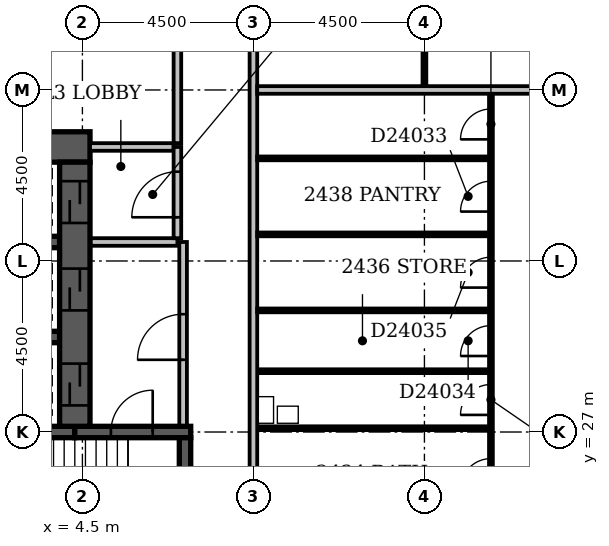
"""IFC4 building model, lengths in metres.
Left out: names, types, materials, properties, quantities, classifications, styles, units other than length and angle.
Written with IfcOpenShell. Run it as: python <this file> out.ifc"""

import sys

from ifc_helpers import new_model, si_unit, direction, frame, frame_2d, origin, place, context, subcontext, project, spatial, rectangle, extrude, element, fill, save


model = new_model("IFC4")
c1 = context("Model", 3, precision=1e-05, world=origin(), true_north=direction((0.0, 1.0)))
c2 = subcontext(c1, "Body", "Model", "MODEL_VIEW")
j1 = project(units=[si_unit("LENGTHUNIT", "METRE"), si_unit("PLANEANGLEUNIT", "RADIAN")], contexts=[c1])
p1 = place(None, origin())
s1 = spatial("IfcSite", under=j1, at=p1, CompositionType="ELEMENT")
p2 = place(p1, origin())
s2 = spatial("IfcBuilding", under=s1, at=p2, CompositionType="ELEMENT")
p3 = place(p2, frame((0.0, 0.0, 97.4)))
s3 = spatial("IfcBuildingStorey", under=s2, at=p3, CompositionType="ELEMENT", Elevation=97.4)
p4 = place(p3, frame((0.1, 34.5, -0.3), z_axis=(0.0, 0.0, 1.0), x_axis=(1.0, 0.0, 0.0)))
e1 = element("IfcWall", 1, at=p4, inside=s3, PredefinedType="SHEAR", context=c2, shape_type="SweptSolid", body=[
    extrude(rectangle(XDim=4.6, YDim=0.8, at=frame_2d((2.3, 0.0))), origin(), (0.0, 0.0, 1.0), 3.6),
])
p5 = place(p3, frame((0.35, 27.0, -0.3), z_axis=(0.0, 0.0, 1.0), x_axis=(1.0, 0.0, 0.0)))
e2 = element("IfcWall", 2, at=p5, inside=s3, PredefinedType="SHEAR", context=c2, shape_type="SweptSolid", body=[
    extrude(rectangle(XDim=3.95, YDim=0.3, at=frame_2d((1.975, 0.0))), origin(), (0.0, 0.0, 1.0), 3.6),
])
for number, where, z_axis, x_axis in (
    (3, (0.9, 29.5, -0.3), (0.0, 0.0, 1.0), (1.0, 0.0, 0.0)),
    (4, (0.9, 32.0, -0.3), (0.0, 0.0, 1.0), (1.0, 0.0, 0.0)),
):
    element("IfcWall", number, at=place(p3, frame(where, z_axis=z_axis, x_axis=x_axis)), inside=s3, PredefinedType="SHEAR", context=c2, shape_type="SweptSolid", body=[
        extrude(rectangle(XDim=3.0, YDim=0.3, at=frame_2d((1.5, 0.0))), origin(), (0.0, 0.0, 1.0), 3.6),
    ])
p6 = place(p3, frame((4.3, 27.0, -0.3), z_axis=(0.0, 0.0, 1.0), x_axis=(1.0, 0.0, 0.0)))
e5 = element("IfcWall", 5, at=p6, inside=s3, PredefinedType="SHEAR", context=c2, shape_type="SweptSolid", body=[
    extrude(rectangle(XDim=3.05, YDim=0.3, at=frame_2d((1.525, 0.0))), origin(), (0.0, 0.0, 1.0), 3.6),
])
p7 = place(p6, frame((0.95, 0.0, 0.3)))
e6 = element("IfcOpeningElement", 6, at=p7, cuts=e5, PredefinedType="OPENING", context=c2, shape_type="SweptSolid", body=[
    extrude(rectangle(XDim=1.1, YDim=2.1, at=frame_2d((0.55, 1.05))), frame((0.0, 0.162, 0.0), z_axis=(0.0, -1.0, 0.0), x_axis=(1.0, 0.0, 0.0)), (0.0, 0.0, 1.0), 0.324),
])
p8 = place(p3, frame((4.3, 27.15, -0.3), z_axis=(0.0, 0.0, 1.0), x_axis=(0.0, 1.0, 0.0)))
e7 = element("IfcWall", 7, at=p8, inside=s3, PredefinedType="SHEAR", context=c2, shape_type="SweptSolid", body=[
    extrude(rectangle(XDim=6.95, YDim=0.8, at=frame_2d((3.475, 0.0))), origin(), (0.0, 0.0, 1.0), 3.6),
])
p9 = place(p8, frame((3.05, 0.0, 0.3)))
e8 = element("IfcOpeningElement", 8, at=p9, cuts=e7, PredefinedType="OPENING", context=c2, shape_type="SweptSolid", body=[
    extrude(rectangle(XDim=1.1, YDim=2.1, at=frame_2d((0.55, 1.05))), frame((0.0, 0.412, 0.0), z_axis=(0.0, -1.0, 0.0), x_axis=(1.0, 0.0, 0.0)), (0.0, 0.0, 1.0), 0.824),
])
p10 = place(p8, frame((0.55, 0.0, 0.3)))
e9 = element("IfcOpeningElement", 9, at=p10, cuts=e7, PredefinedType="OPENING", context=c2, shape_type="SweptSolid", body=[
    extrude(rectangle(XDim=1.1, YDim=2.1, at=frame_2d((0.55, 1.05))), frame((0.0, 0.412, 0.0), z_axis=(0.0, -1.0, 0.0), x_axis=(1.0, 0.0, 0.0)), (0.0, 0.0, 1.0), 0.824),
])
p11 = place(p8, frame((5.35, 0.0, 0.3)))
e10 = element("IfcOpeningElement", 10, at=p11, cuts=e7, PredefinedType="OPENING", context=c2, shape_type="SweptSolid", body=[
    extrude(rectangle(XDim=1.1, YDim=2.1, at=frame_2d((0.55, 1.05))), frame((0.0, 0.412, 0.0), z_axis=(0.0, -1.0, 0.0), x_axis=(1.0, 0.0, 0.0)), (0.0, 0.0, 1.0), 0.824),
])
p12 = place(p3, frame((7.2, 22.65, -0.3), z_axis=(0.0, 0.0, 1.0), x_axis=(0.0, 1.0, 0.0)))
e11 = element("IfcWall", 11, at=p12, inside=s3, PredefinedType="SHEAR", context=c2, shape_type="SweptSolid", body=[
    extrude(rectangle(XDim=4.2, YDim=0.3, at=frame_2d((2.1, 0.0))), origin(), (0.0, 0.0, 1.0), 3.6),
])
p13 = place(p12, frame((0.8, 0.0, 0.3)))
e12 = element("IfcOpeningElement", 12, at=p13, cuts=e11, PredefinedType="OPENING", context=c2, shape_type="SweptSolid", body=[
    extrude(rectangle(XDim=1.1, YDim=2.1, at=frame_2d((0.55, 1.05))), frame((0.0, 0.162, 0.0), z_axis=(0.0, -1.0, 0.0), x_axis=(1.0, 0.0, 0.0)), (0.0, 0.0, 1.0), 0.324),
])
p14 = place(p3, frame((4.72, 32.0, 0.0), z_axis=(0.0, 0.0, 1.0), x_axis=(1.0, 0.0, 0.0)))
e13 = element("IfcWall", 13, at=p14, inside=s3, PredefinedType="PARTITIONING", context=c2, shape_type="SweptSolid", body=[
    extrude(rectangle(XDim=2.28, YDim=0.2, at=frame_2d((1.14, 0.0))), origin(), (0.0, 0.0, 1.0), 3.3),
])
p15 = place(p3, frame((7.0, 32.1, 0.0), z_axis=(0.0, 0.0, 1.0), x_axis=(0.0, 1.0, 0.0)))
e14 = element("IfcWall", 14, at=p15, inside=s3, PredefinedType="PARTITIONING", context=c2, shape_type="SweptSolid", body=[
    extrude(rectangle(XDim=2.4, YDim=0.2, at=frame_2d((1.2, 0.0))), origin(), (0.0, 0.0, 1.0), 3.3),
])
p16 = place(p15, frame((0.55, 0.0, 0.0)))
e15 = element("IfcOpeningElement", 15, at=p16, cuts=e14, PredefinedType="OPENING", context=c2, shape_type="SweptSolid", body=[
    extrude(rectangle(XDim=1.2, YDim=2.1, at=frame_2d((0.6, 1.05))), frame((0.0, 0.112, 0.0), z_axis=(0.0, -1.0, 0.0), x_axis=(1.0, 0.0, 0.0)), (0.0, 0.0, 1.0), 0.224),
])
p17 = place(p3, frame((4.7, 34.5, 0.0), z_axis=(0.0, 0.0, 1.0), x_axis=(1.0, 0.0, 0.0)))
e16 = element("IfcWall", 16, at=p17, inside=s3, PredefinedType="PARTITIONING", context=c2, shape_type="SweptSolid", body=[
    extrude(rectangle(XDim=2.2, YDim=0.2, at=frame_2d((1.1, 0.0))), origin(), (0.0, 0.0, 1.0), 3.3),
])
p18 = place(p3, frame((7.15, 27.17, 0.0), z_axis=(0.0, 0.0, 1.0), x_axis=(0.0, 1.0, 0.0)))
e17 = element("IfcWall", 17, at=p18, inside=s3, PredefinedType="PARTITIONING", context=c2, shape_type="SweptSolid", body=[
    extrude(rectangle(XDim=4.83, YDim=0.2, at=frame_2d((2.415, 0.0))), origin(), (0.0, 0.0, 1.0), 3.3),
])
p19 = place(p18, frame((1.73, 0.0, 0.0)))
e18 = element("IfcOpeningElement", 18, at=p19, cuts=e17, PredefinedType="OPENING", context=c2, shape_type="SweptSolid", body=[
    extrude(rectangle(XDim=1.2, YDim=2.1, at=frame_2d((0.6, 1.05))), frame((0.0, 0.112, 0.0), z_axis=(0.0, -1.0, 0.0), x_axis=(1.0, 0.0, 0.0)), (0.0, 0.0, 1.0), 0.224),
])
p20 = place(p3, frame((9.0, 5.0, 0.0), z_axis=(0.0, 0.0, 1.0), x_axis=(0.0, 1.0, 0.0)))
e19 = element("IfcWall", 19, at=p20, inside=s3, PredefinedType="PARTITIONING", context=c2, shape_type="SweptSolid", body=[
    extrude(rectangle(XDim=44.5, YDim=0.2, at=frame_2d((22.25, 0.0))), origin(), (0.0, 0.0, 1.0), 3.3),
])
p21 = place(p20, frame((18.4, 0.0, 0.0)))
e20 = element("IfcOpeningElement", 20, at=p21, cuts=e19, PredefinedType="OPENING", context=c2, shape_type="SweptSolid", body=[
    extrude(rectangle(XDim=1.0, YDim=2.1, at=frame_2d((0.5, 1.05))), frame((0.0, 0.112, 0.0), z_axis=(0.0, -1.0, 0.0), x_axis=(1.0, 0.0, 0.0)), (0.0, 0.0, 1.0), 0.224),
])
p22 = place(p20, frame((11.7, 0.0, 0.0)))
e21 = element("IfcOpeningElement", 21, at=p22, cuts=e19, PredefinedType="OPENING", context=c2, shape_type="SweptSolid", body=[
    extrude(rectangle(XDim=1.0, YDim=2.1, at=frame_2d((0.5, 1.05))), frame((0.0, 0.112, 0.0), z_axis=(0.0, -1.0, 0.0), x_axis=(1.0, 0.0, 0.0)), (0.0, 0.0, 1.0), 0.224),
])
p23 = place(p20, frame((37.25, 0.0, 0.0)))
e22 = element("IfcOpeningElement", 22, at=p23, cuts=e19, PredefinedType="OPENING", context=c2, shape_type="SweptSolid", body=[
    extrude(rectangle(XDim=0.9, YDim=2.1, at=frame_2d((0.45, 1.05))), frame((0.0, 0.112, 0.0), z_axis=(0.0, -1.0, 0.0), x_axis=(1.0, 0.0, 0.0)), (0.0, 0.0, 1.0), 0.224),
])
p24 = place(p20, frame((1.5, 0.0, 0.0)))
e23 = element("IfcOpeningElement", 23, at=p24, cuts=e19, PredefinedType="OPENING", context=c2, shape_type="SweptSolid", body=[
    extrude(rectangle(XDim=0.9, YDim=2.1, at=frame_2d((0.45, 1.05))), frame((0.0, 0.112, 0.0), z_axis=(0.0, -1.0, 0.0), x_axis=(1.0, 0.0, 0.0)), (0.0, 0.0, 1.0), 0.224),
])
p25 = place(p3, frame((15.25, 24.7, 0.0), z_axis=(0.0, 0.0, 1.0), x_axis=(0.0, 1.0, 0.0)))
e24 = element("IfcWall", 24, at=p25, inside=s3, PredefinedType="PARTITIONING", context=c2, shape_type="SweptSolid", body=[
    extrude(rectangle(XDim=11.2, YDim=0.1, at=frame_2d((5.6, 0.0))), origin(), (0.0, 0.0, 1.0), 3.3),
])
p26 = place(p25, frame((0.8, 0.0, 0.0)))
e25 = element("IfcOpeningElement", 25, at=p26, cuts=e24, PredefinedType="OPENING", context=c2, shape_type="SweptSolid", body=[
    extrude(rectangle(XDim=0.8, YDim=2.1, at=frame_2d((0.4, 1.05))), frame((0.0, 0.062, 0.0), z_axis=(0.0, -1.0, 0.0), x_axis=(1.0, 0.0, 0.0)), (0.0, 0.0, 1.0), 0.124),
])
p27 = place(p25, frame((8.1, 0.0, 0.0)))
e26 = element("IfcOpeningElement", 26, at=p27, cuts=e24, PredefinedType="OPENING", context=c2, shape_type="SweptSolid", body=[
    extrude(rectangle(XDim=0.8, YDim=2.1, at=frame_2d((0.4, 1.05))), frame((0.0, 0.062, 0.0), z_axis=(0.0, -1.0, 0.0), x_axis=(1.0, 0.0, 0.0)), (0.0, 0.0, 1.0), 0.124),
])
p28 = place(p25, frame((4.3, 0.0, 0.0)))
e27 = element("IfcOpeningElement", 27, at=p28, cuts=e24, PredefinedType="OPENING", context=c2, shape_type="SweptSolid", body=[
    extrude(rectangle(XDim=0.8, YDim=2.1, at=frame_2d((0.4, 1.05))), frame((0.0, 0.062, 0.0), z_axis=(0.0, -1.0, 0.0), x_axis=(1.0, 0.0, 0.0)), (0.0, 0.0, 1.0), 0.124),
])
p29 = place(p25, frame((6.1, 0.0, 0.0)))
e28 = element("IfcOpeningElement", 28, at=p29, cuts=e24, PredefinedType="OPENING", context=c2, shape_type="SweptSolid", body=[
    extrude(rectangle(XDim=0.8, YDim=2.1, at=frame_2d((0.4, 1.05))), frame((0.0, 0.062, 0.0), z_axis=(0.0, -1.0, 0.0), x_axis=(1.0, 0.0, 0.0)), (0.0, 0.0, 1.0), 0.124),
])
p30 = place(p25, frame((10.0, 0.0, 0.0)))
e29 = element("IfcOpeningElement", 29, at=p30, cuts=e24, PredefinedType="OPENING", context=c2, shape_type="SweptSolid", body=[
    extrude(rectangle(XDim=0.8, YDim=2.1, at=frame_2d((0.4, 1.05))), frame((0.0, 0.062, 0.0), z_axis=(0.0, -1.0, 0.0), x_axis=(1.0, 0.0, 0.0)), (0.0, 0.0, 1.0), 0.124),
])
p31 = place(p25, frame((2.75, 0.0, 0.0)))
e30 = element("IfcOpeningElement", 30, at=p31, cuts=e24, PredefinedType="OPENING", context=c2, shape_type="SweptSolid", body=[
    extrude(rectangle(XDim=0.8, YDim=2.1, at=frame_2d((0.4, 1.05))), frame((0.0, 0.062, 0.0), z_axis=(0.0, -1.0, 0.0), x_axis=(1.0, 0.0, 0.0)), (0.0, 0.0, 1.0), 0.124),
])
p32 = place(p3, frame((9.1, 27.1, 0.0), z_axis=(0.0, 0.0, 1.0), x_axis=(1.0, 0.0, 0.0)))
e31 = element("IfcWall", 31, at=p32, inside=s3, PredefinedType="PLUMBINGWALL", context=c2, shape_type="SweptSolid", body=[
    extrude(rectangle(XDim=6.1, YDim=0.1, at=frame_2d((3.05, 0.0))), origin(), (0.0, 0.0, 1.0), 2.7),
])
p33 = place(p3, frame((9.1, 28.6, 0.0), z_axis=(0.0, 0.0, 1.0), x_axis=(1.0, 0.0, 0.0)))
e32 = element("IfcWall", 32, at=p33, inside=s3, PredefinedType="PLUMBINGWALL", context=c2, shape_type="SweptSolid", body=[
    extrude(rectangle(XDim=6.1, YDim=0.1, at=frame_2d((3.05, 0.0))), origin(), (0.0, 0.0, 1.0), 3.3),
])
for number, where, z_axis, x_axis in (
    (33, (9.1, 30.2, 0.0), (0.0, 0.0, 1.0), (1.0, 0.0, 0.0)),
    (34, (9.1, 32.2, 0.0), (0.0, 0.0, 1.0), (1.0, 0.0, 0.0)),
    (35, (9.1, 34.2, 0.0), (0.0, 0.0, 1.0), (1.0, 0.0, 0.0)),
):
    element("IfcWall", number, at=place(p3, frame(where, z_axis=z_axis, x_axis=x_axis)), inside=s3, PredefinedType="PARTITIONING", context=c2, shape_type="SweptSolid", body=[
        extrude(rectangle(XDim=6.1, YDim=0.1, at=frame_2d((3.05, 0.0))), origin(), (0.0, 0.0, 1.0), 3.3),
    ])
p34 = place(p3, frame((7.0, 34.6, 0.0), z_axis=(0.0, 0.0, 1.0), x_axis=(0.0, 1.0, 0.0)))
e36 = element("IfcWall", 36, at=p34, inside=s3, PredefinedType="PARTITIONING", context=c2, shape_type="SweptSolid", body=[
    extrude(rectangle(XDim=14.8, YDim=0.2, at=frame_2d((7.4, 0.0))), origin(), (0.0, 0.0, 1.0), 3.3),
])
p35 = place(p34, frame((4.45, 0.0, 0.0)))
e37 = element("IfcOpeningElement", 37, at=p35, cuts=e36, PredefinedType="OPENING", context=c2, shape_type="SweptSolid", body=[
    extrude(rectangle(XDim=0.9, YDim=2.1, at=frame_2d((0.45, 1.05))), frame((0.0, 0.112, 0.0), z_axis=(0.0, -1.0, 0.0), x_axis=(1.0, 0.0, 0.0)), (0.0, 0.0, 1.0), 0.224),
])
p36 = place(p34, frame((11.95, 0.0, 0.0)))
e38 = element("IfcOpeningElement", 38, at=p36, cuts=e36, PredefinedType="OPENING", context=c2, shape_type="SweptSolid", body=[
    extrude(rectangle(XDim=0.9, YDim=2.1, at=frame_2d((0.45, 1.05))), frame((0.0, 0.112, 0.0), z_axis=(0.0, -1.0, 0.0), x_axis=(1.0, 0.0, 0.0)), (0.0, 0.0, 1.0), 0.224),
])
p37 = place(p3, frame((9.1, 36.0, 0.0), z_axis=(0.0, 0.0, 1.0), x_axis=(1.0, 0.0, 0.0)))
e39 = element("IfcWall", 39, at=p37, inside=s3, PredefinedType="PARTITIONING", context=c2, shape_type="SweptSolid", body=[
    extrude(rectangle(XDim=12.8, YDim=0.2, at=frame_2d((6.4, 0.0))), origin(), (0.0, 0.0, 1.0), 2.4),
])
p38 = place(p3, frame((13.5, 36.1, 0.0), z_axis=(0.0, 0.0, 1.0), x_axis=(0.0, 1.0, 0.0)))
e40 = element("IfcWall", 40, at=p38, inside=s3, PredefinedType="PARTITIONING", context=c2, shape_type="SweptSolid", body=[
    extrude(rectangle(XDim=13.3, YDim=0.1, at=frame_2d((6.65, 0.0))), origin(), (0.0, 0.0, 1.0), 3.3),
])
p39 = place(p19, origin())
e41 = element("IfcDoor", 41, at=p39, inside=s3, OperationType="SINGLE_SWING_LEFT", PredefinedType="DOOR", context=c2, shape_type="SweptSolid", body=[
    extrude(rectangle(XDim=1.2, YDim=2.1, at=frame_2d((0.6, 1.05))), frame((0.0, 0.025, 0.0), z_axis=(0.0, -1.0, 0.0), x_axis=(1.0, 0.0, 0.0)), (0.0, 0.0, 1.0), 0.05),
])
fill(e18, e41)
p40 = place(p9, origin())
e42 = element("IfcDoor", 42, at=p40, inside=s3, OperationType="SLIDING_TO_LEFT", PredefinedType="DOOR", context=c2, shape_type="SweptSolid", body=[
    extrude(rectangle(XDim=1.1, YDim=2.1, at=frame_2d((0.55, 1.05))), frame((0.0, 0.025, 0.0), z_axis=(0.0, -1.0, 0.0), x_axis=(1.0, 0.0, 0.0)), (0.0, 0.0, 1.0), 0.05),
])
fill(e8, e42)
p41 = place(p10, origin())
e43 = element("IfcDoor", 43, at=p41, inside=s3, OperationType="SLIDING_TO_LEFT", PredefinedType="DOOR", context=c2, shape_type="SweptSolid", body=[
    extrude(rectangle(XDim=1.1, YDim=2.1, at=frame_2d((0.55, 1.05))), frame((0.0, 0.025, 0.0), z_axis=(0.0, -1.0, 0.0), x_axis=(1.0, 0.0, 0.0)), (0.0, 0.0, 1.0), 0.05),
])
fill(e9, e43)
p42 = place(p16, origin())
e44 = element("IfcDoor", 44, at=p42, inside=s3, OperationType="SINGLE_SWING_LEFT", PredefinedType="DOOR", context=c2, shape_type="SweptSolid", body=[
    extrude(rectangle(XDim=1.2, YDim=2.1, at=frame_2d((0.6, 1.05))), frame((0.0, 0.025, 0.0), z_axis=(0.0, -1.0, 0.0), x_axis=(1.0, 0.0, 0.0)), (0.0, 0.0, 1.0), 0.05),
])
fill(e15, e44)
p43 = place(p11, origin())
e45 = element("IfcDoor", 45, at=p43, inside=s3, OperationType="SLIDING_TO_LEFT", PredefinedType="DOOR", context=c2, shape_type="SweptSolid", body=[
    extrude(rectangle(XDim=1.1, YDim=2.1, at=frame_2d((0.55, 1.05))), frame((0.0, 0.025, 0.0), z_axis=(0.0, -1.0, 0.0), x_axis=(1.0, 0.0, 0.0)), (0.0, 0.0, 1.0), 0.05),
])
fill(e10, e45)
p44 = place(p7, frame((1.1, 0.0, 0.0), z_axis=(0.0, 0.0, 1.0), x_axis=(-1.0, 0.0, 0.0)))
e46 = element("IfcDoor", 46, at=p44, inside=s3, OperationType="SINGLE_SWING_LEFT", PredefinedType="DOOR", context=c2, shape_type="SweptSolid", body=[
    extrude(rectangle(XDim=1.1, YDim=2.1, at=frame_2d((0.55, 1.05))), frame((0.0, 0.025, 0.0), z_axis=(0.0, -1.0, 0.0), x_axis=(1.0, 0.0, 0.0)), (0.0, 0.0, 1.0), 0.05),
])
fill(e6, e46)
p45 = place(p26, origin())
e47 = element("IfcDoor", 47, at=p45, inside=s3, OperationType="SINGLE_SWING_LEFT", PredefinedType="DOOR", context=c2, shape_type="SweptSolid", body=[
    extrude(rectangle(XDim=0.8, YDim=2.1, at=frame_2d((0.4, 1.05))), frame((0.0, 0.025, 0.0), z_axis=(0.0, -1.0, 0.0), x_axis=(1.0, 0.0, 0.0)), (0.0, 0.0, 1.0), 0.05),
])
fill(e25, e47)
p46 = place(p27, origin())
e48 = element("IfcDoor", 48, at=p46, inside=s3, OperationType="SINGLE_SWING_LEFT", PredefinedType="DOOR", context=c2, shape_type="SweptSolid", body=[
    extrude(rectangle(XDim=0.8, YDim=2.1, at=frame_2d((0.4, 1.05))), frame((0.0, 0.025, 0.0), z_axis=(0.0, -1.0, 0.0), x_axis=(1.0, 0.0, 0.0)), (0.0, 0.0, 1.0), 0.05),
])
fill(e26, e48)
p47 = place(p28, origin())
e49 = element("IfcDoor", 49, at=p47, inside=s3, OperationType="SINGLE_SWING_LEFT", PredefinedType="DOOR", context=c2, shape_type="SweptSolid", body=[
    extrude(rectangle(XDim=0.8, YDim=2.1, at=frame_2d((0.4, 1.05))), frame((0.0, 0.025, 0.0), z_axis=(0.0, -1.0, 0.0), x_axis=(1.0, 0.0, 0.0)), (0.0, 0.0, 1.0), 0.05),
])
fill(e27, e49)
p48 = place(p29, origin())
e50 = element("IfcDoor", 50, at=p48, inside=s3, OperationType="SINGLE_SWING_LEFT", PredefinedType="DOOR", context=c2, shape_type="SweptSolid", body=[
    extrude(rectangle(XDim=0.8, YDim=2.1, at=frame_2d((0.4, 1.05))), frame((0.0, 0.025, 0.0), z_axis=(0.0, -1.0, 0.0), x_axis=(1.0, 0.0, 0.0)), (0.0, 0.0, 1.0), 0.05),
])
fill(e28, e50)
p49 = place(p30, origin())
e51 = element("IfcDoor", 51, at=p49, inside=s3, OperationType="SINGLE_SWING_LEFT", PredefinedType="DOOR", context=c2, shape_type="SweptSolid", body=[
    extrude(rectangle(XDim=0.8, YDim=2.1, at=frame_2d((0.4, 1.05))), frame((0.0, 0.025, 0.0), z_axis=(0.0, -1.0, 0.0), x_axis=(1.0, 0.0, 0.0)), (0.0, 0.0, 1.0), 0.05),
])
fill(e29, e51)
p50 = place(p31, origin())
e52 = element("IfcDoor", 52, at=p50, inside=s3, OperationType="SINGLE_SWING_LEFT", PredefinedType="DOOR", context=c2, shape_type="SweptSolid", body=[
    extrude(rectangle(XDim=0.8, YDim=2.1, at=frame_2d((0.4, 1.05))), frame((0.0, 0.025, 0.0), z_axis=(0.0, -1.0, 0.0), x_axis=(1.0, 0.0, 0.0)), (0.0, 0.0, 1.0), 0.05),
])
fill(e30, e52)
save(model, sys.argv[1])
